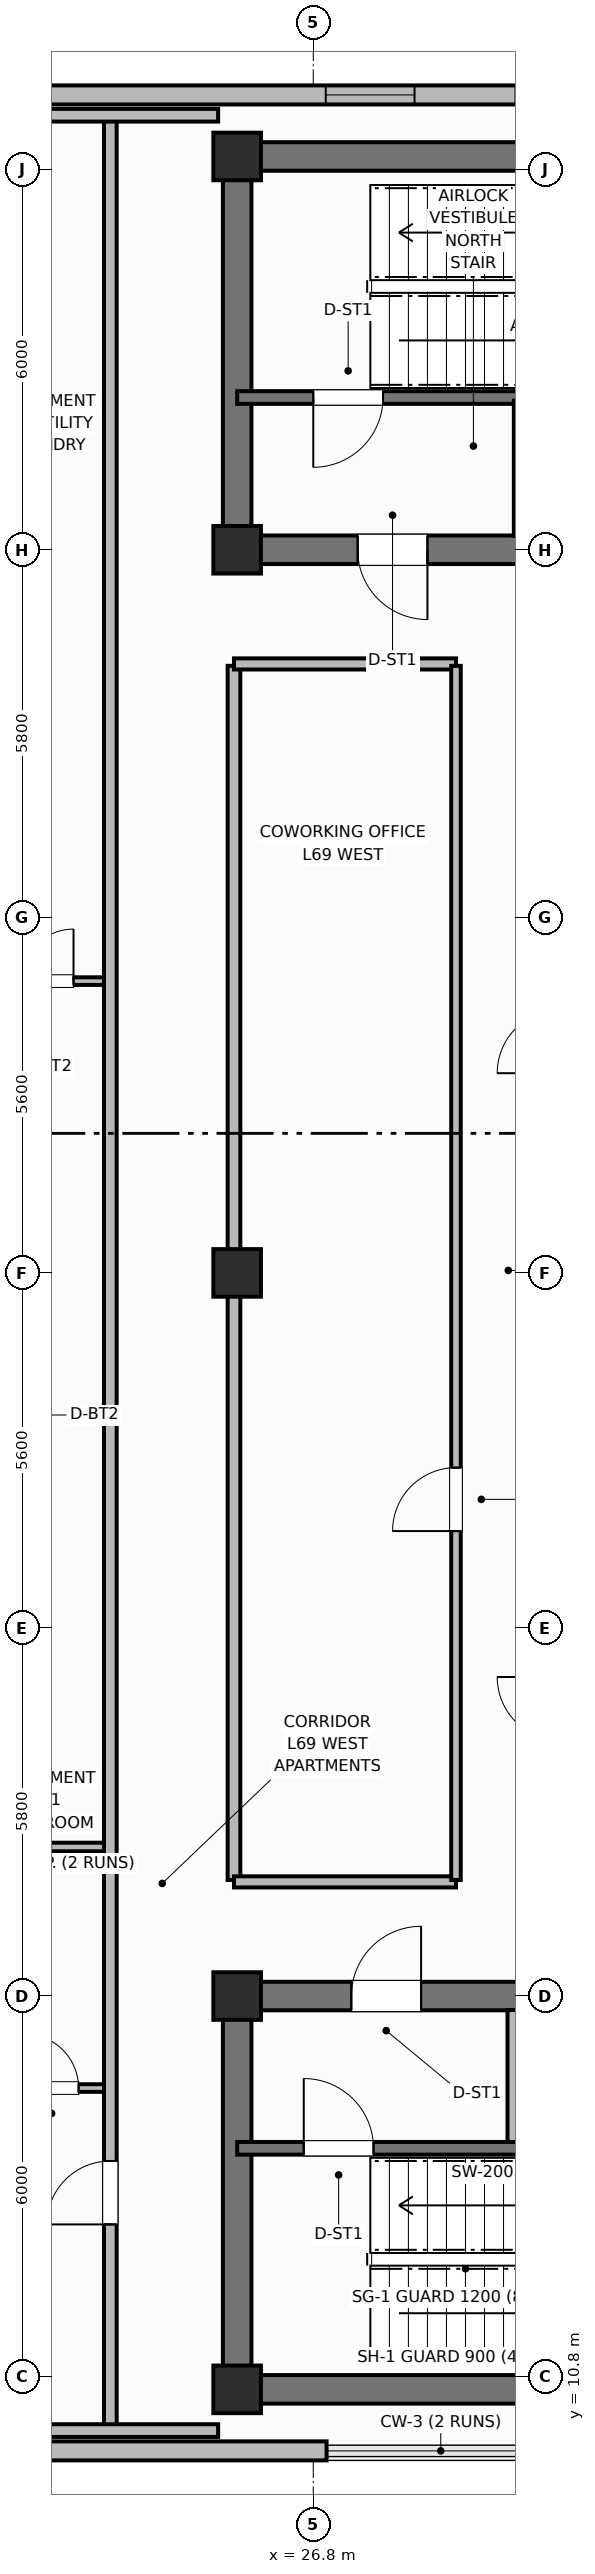
"""IFC4 building model, lengths in metres.
Left out: names, types, materials, properties, quantities, classifications, styles, units other than length and angle.
Written with IfcOpenShell. Run it as: python <this file> out.ifc"""

import sys

from ifc_helpers import new_model, si_unit, direction, frame, frame_2d, origin, origin_2d, place, context, subcontext, project, spatial, rectangle, extrude, element, fill, save


model = new_model("IFC4")
c1 = context("Model", 3, precision=1e-05, world=origin(), true_north=direction((0.0, 1.0)))
c2 = subcontext(c1, "Body", "Model", "MODEL_VIEW")
j1 = project(units=[si_unit("LENGTHUNIT", "METRE"), si_unit("PLANEANGLEUNIT", "RADIAN")], contexts=[c1])
p1 = place(None, origin())
s1 = spatial("IfcSite", under=j1, at=p1, CompositionType="ELEMENT")
p2 = place(p1, origin())
s2 = spatial("IfcBuilding", under=s1, at=p2, CompositionType="ELEMENT")
p3 = place(p2, frame((0.0, 0.0, 275.0)))
s3 = spatial("IfcBuildingStorey", under=s2, at=p3, CompositionType="ELEMENT", Elevation=275.0)
p4 = place(p3, frame((52.8, 10.6, 0.0), z_axis=(0.0, 0.0, 1.0), x_axis=(-1.0, 0.0, 0.0)))
e1 = element("IfcWall", 1, at=p4, inside=s3, PredefinedType="SHEAR", context=c2, shape_type="SweptSolid", body=[
    extrude(rectangle(XDim=27.2, YDim=0.45, at=frame_2d((13.6, 0.0))), origin(), (0.0, 0.0, 1.0), 3.7),
])
p5 = place(p3, frame((25.6, 10.825, 0.0), z_axis=(0.0, 0.0, 1.0), x_axis=(0.0, 1.0, 0.0)))
e2 = element("IfcWall", 2, at=p5, inside=s3, PredefinedType="SHEAR", context=c2, shape_type="SweptSolid", body=[
    extrude(rectangle(XDim=5.75, YDim=0.45, at=frame_2d((2.875, 0.0))), origin(), (0.0, 0.0, 1.0), 3.7),
])
p6 = place(p3, frame((25.6, 16.8, 0.0), z_axis=(0.0, 0.0, 1.0), x_axis=(1.0, 0.0, 0.0)))
e3 = element("IfcWall", 3, at=p6, inside=s3, PredefinedType="SHEAR", context=c2, shape_type="SweptSolid", body=[
    extrude(rectangle(XDim=27.2, YDim=0.45, at=frame_2d((13.6, 0.0))), origin(), (0.0, 0.0, 1.0), 3.7),
])
p7 = place(p6, frame((1.8, 0.0, 0.0)))
e4 = element("IfcOpeningElement", 4, at=p7, cuts=e3, PredefinedType="OPENING", context=c2, shape_type="SweptSolid", body=[
    extrude(rectangle(XDim=1.1, YDim=2.15, at=frame_2d((0.55, 1.075))), frame((0.0, 0.235, 0.0), z_axis=(0.0, -1.0, 0.0), x_axis=(1.0, 0.0, 0.0)), (0.0, 0.0, 1.0), 0.47),
])
p8 = place(p6, frame((5.6, 0.0, 0.0)))
e5 = element("IfcOpeningElement", 5, at=p8, cuts=e3, PredefinedType="OPENING", context=c2, shape_type="SweptSolid", body=[
    extrude(rectangle(XDim=0.85, YDim=2.1, at=frame_2d((0.425, 1.05))), frame((0.0, 0.235, 0.0), z_axis=(0.0, -1.0, 0.0), x_axis=(1.0, 0.0, 0.0)), (0.0, 0.0, 1.0), 0.47),
])
p9 = place(p6, frame((13.0, 0.0, 0.0)))
e6 = element("IfcOpeningElement", 6, at=p9, cuts=e3, PredefinedType="OPENING", context=c2, shape_type="SweptSolid", body=[
    extrude(rectangle(XDim=1.2, YDim=2.15, at=frame_2d((0.6, 1.075))), frame((0.0, 0.235, 0.0), z_axis=(0.0, -1.0, 0.0), x_axis=(1.0, 0.0, 0.0)), (0.0, 0.0, 1.0), 0.47),
])
p10 = place(p6, frame((19.2, 0.0, 0.0)))
e7 = element("IfcOpeningElement", 7, at=p10, cuts=e3, PredefinedType="OPENING", context=c2, shape_type="SweptSolid", body=[
    extrude(rectangle(XDim=0.85, YDim=2.1, at=frame_2d((0.425, 1.05))), frame((0.0, 0.235, 0.0), z_axis=(0.0, -1.0, 0.0), x_axis=(1.0, 0.0, 0.0)), (0.0, 0.0, 1.0), 0.47),
])
p11 = place(p6, frame((23.8, 0.0, 0.0)))
e8 = element("IfcOpeningElement", 8, at=p11, cuts=e3, PredefinedType="OPENING", context=c2, shape_type="SweptSolid", body=[
    extrude(rectangle(XDim=0.9, YDim=2.1, at=frame_2d((0.45, 1.05))), frame((0.0, 0.235, 0.0), z_axis=(0.0, -1.0, 0.0), x_axis=(1.0, 0.0, 0.0)), (0.0, 0.0, 1.0), 0.47),
])
p12 = place(p3, frame((25.6, 45.8, 0.0), z_axis=(0.0, 0.0, 1.0), x_axis=(1.0, 0.0, 0.0)))
e9 = element("IfcWall", 9, at=p12, inside=s3, PredefinedType="SHEAR", context=c2, shape_type="SweptSolid", body=[
    extrude(rectangle(XDim=27.2, YDim=0.45, at=frame_2d((13.6, 0.0))), origin(), (0.0, 0.0, 1.0), 3.7),
])
p13 = place(p3, frame((25.6, 39.825, 0.0), z_axis=(0.0, 0.0, 1.0), x_axis=(0.0, 1.0, 0.0)))
e10 = element("IfcWall", 10, at=p13, inside=s3, PredefinedType="SHEAR", context=c2, shape_type="SweptSolid", body=[
    extrude(rectangle(XDim=5.75, YDim=0.45, at=frame_2d((2.875, 0.0))), origin(), (0.0, 0.0, 1.0), 3.7),
])
p14 = place(p3, frame((52.8, 39.6, 0.0), z_axis=(0.0, 0.0, 1.0), x_axis=(-1.0, 0.0, 0.0)))
e11 = element("IfcWall", 11, at=p14, inside=s3, PredefinedType="SHEAR", context=c2, shape_type="SweptSolid", body=[
    extrude(rectangle(XDim=27.2, YDim=0.45, at=frame_2d((13.6, 0.0))), origin(), (0.0, 0.0, 1.0), 3.7),
])
p15 = place(p14, frame((24.2, 0.0, 0.0)))
e12 = element("IfcOpeningElement", 12, at=p15, cuts=e11, PredefinedType="OPENING", context=c2, shape_type="SweptSolid", body=[
    extrude(rectangle(XDim=1.1, YDim=2.15, at=frame_2d((0.55, 1.075))), frame((0.0, 0.235, 0.0), z_axis=(0.0, -1.0, 0.0), x_axis=(1.0, 0.0, 0.0)), (0.0, 0.0, 1.0), 0.47),
])
p16 = place(p14, frame((20.55, 0.0, 0.0)))
e13 = element("IfcOpeningElement", 13, at=p16, cuts=e11, PredefinedType="OPENING", context=c2, shape_type="SweptSolid", body=[
    extrude(rectangle(XDim=0.95, YDim=2.1, at=frame_2d((0.475, 1.05))), frame((0.0, 0.235, 0.0), z_axis=(0.0, -1.0, 0.0), x_axis=(1.0, 0.0, 0.0)), (0.0, 0.0, 1.0), 0.47),
])
p17 = place(p14, frame((15.1, 0.0, 0.0)))
e14 = element("IfcOpeningElement", 14, at=p17, cuts=e11, PredefinedType="OPENING", context=c2, shape_type="SweptSolid", body=[
    extrude(rectangle(XDim=1.2, YDim=2.15, at=frame_2d((0.6, 1.075))), frame((0.0, 0.235, 0.0), z_axis=(0.0, -1.0, 0.0), x_axis=(1.0, 0.0, 0.0)), (0.0, 0.0, 1.0), 0.47),
])
p18 = place(p14, frame((13.05, 0.0, 0.0)))
e15 = element("IfcOpeningElement", 15, at=p18, cuts=e11, PredefinedType="OPENING", context=c2, shape_type="SweptSolid", body=[
    extrude(rectangle(XDim=0.85, YDim=2.1, at=frame_2d((0.425, 1.05))), frame((0.0, 0.235, 0.0), z_axis=(0.0, -1.0, 0.0), x_axis=(1.0, 0.0, 0.0)), (0.0, 0.0, 1.0), 0.47),
])
p19 = place(p14, frame((11.0, 0.0, 0.0)))
e16 = element("IfcOpeningElement", 16, at=p19, cuts=e11, PredefinedType="OPENING", context=c2, shape_type="SweptSolid", body=[
    extrude(rectangle(XDim=0.85, YDim=2.1, at=frame_2d((0.425, 1.05))), frame((0.0, 0.235, 0.0), z_axis=(0.0, -1.0, 0.0), x_axis=(1.0, 0.0, 0.0)), (0.0, 0.0, 1.0), 0.47),
])
p20 = place(p14, frame((7.35, 0.0, 0.0)))
e17 = element("IfcOpeningElement", 17, at=p20, cuts=e11, PredefinedType="OPENING", context=c2, shape_type="SweptSolid", body=[
    extrude(rectangle(XDim=0.85, YDim=2.1, at=frame_2d((0.425, 1.05))), frame((0.0, 0.235, 0.0), z_axis=(0.0, -1.0, 0.0), x_axis=(1.0, 0.0, 0.0)), (0.0, 0.0, 1.0), 0.47),
])
p21 = place(p14, frame((4.2, 0.0, 0.0)))
e18 = element("IfcOpeningElement", 18, at=p21, cuts=e11, PredefinedType="OPENING", context=c2, shape_type="SweptSolid", body=[
    extrude(rectangle(XDim=1.3, YDim=2.2, at=frame_2d((0.65, 1.1))), frame((0.0, 0.235, 0.0), z_axis=(0.0, -1.0, 0.0), x_axis=(1.0, 0.0, 0.0)), (0.0, 0.0, 1.0), 0.47),
])
for number, where, z_axis, x_axis in (
    (19, (25.6, 10.6, 0.0), (0.0, 0.0, 1.0), (1.0, 0.0, 0.0)),
    (20, (25.6, 16.8, 0.0), (0.0, 0.0, 1.0), (1.0, 0.0, 0.0)),
    (21, (25.6, 39.6, 0.0), (0.0, 0.0, 1.0), (1.0, 0.0, 0.0)),
    (22, (25.6, 45.8, 0.0), (0.0, 0.0, 1.0), (1.0, 0.0, 0.0)),
    (23, (25.6, 28.2, 0.0), (0.0, 0.0, 1.0), (1.0, 0.0, 0.0)),
):
    element("IfcColumn", number, at=place(p3, frame(where, z_axis=z_axis, x_axis=x_axis)), inside=s3, PredefinedType="COLUMN", context=c2, shape_type="SweptSolid", body=[
        extrude(rectangle(XDim=0.75, YDim=0.75, at=origin_2d()), origin(), (0.0, 0.0, 1.0), 3.7),
    ])
p22 = place(p3, frame((22.56, 9.63, 0.0), z_axis=(0.0, 0.0, 1.0), x_axis=(1.0, 0.0, 0.0)))
e24 = element("IfcWall", 24, at=p22, inside=s3, PredefinedType="SOLIDWALL", context=c2, shape_type="SweptSolid", body=[
    extrude(rectangle(XDim=4.45, YDim=0.3, at=frame_2d((2.225, 0.0))), origin(), (0.0, 0.0, 1.0), 2.73),
])
p23 = place(p3, frame((47.79, 46.77, 0.0), z_axis=(0.0, 0.0, 1.0), x_axis=(-1.0, 0.0, 0.0)))
e25 = element("IfcWall", 25, at=p23, inside=s3, PredefinedType="SOLIDWALL", context=c2, shape_type="SweptSolid", body=[
    extrude(rectangle(XDim=25.23, YDim=0.3, at=frame_2d((12.615, 0.0))), origin(), (0.0, 0.0, 1.0), 2.73),
])
p24 = place(p23, frame((1.446, 0.0, 0.76)))
e26 = element("IfcOpeningElement", 26, at=p24, cuts=e25, PredefinedType="OPENING", context=c2, shape_type="SweptSolid", body=[
    extrude(rectangle(XDim=1.4, YDim=1.85, at=frame_2d((0.7, 0.925))), frame((0.0, 0.16, 0.0), z_axis=(0.0, -1.0, 0.0), x_axis=(1.0, 0.0, 0.0)), (0.0, 0.0, 1.0), 0.32),
])
p25 = place(p23, frame((7.428, 0.0, 0.76)))
e27 = element("IfcOpeningElement", 27, at=p25, cuts=e25, PredefinedType="OPENING", context=c2, shape_type="SweptSolid", body=[
    extrude(rectangle(XDim=1.4, YDim=1.85, at=frame_2d((0.7, 0.925))), frame((0.0, 0.16, 0.0), z_axis=(0.0, -1.0, 0.0), x_axis=(1.0, 0.0, 0.0)), (0.0, 0.0, 1.0), 0.32),
])
p26 = place(p23, frame((9.719, 0.0, 0.76)))
e28 = element("IfcOpeningElement", 28, at=p26, cuts=e25, PredefinedType="OPENING", context=c2, shape_type="SweptSolid", body=[
    extrude(rectangle(XDim=1.4, YDim=1.85, at=frame_2d((0.7, 0.925))), frame((0.0, 0.16, 0.0), z_axis=(0.0, -1.0, 0.0), x_axis=(1.0, 0.0, 0.0)), (0.0, 0.0, 1.0), 0.32),
])
p27 = place(p23, frame((14.111, 0.0, 0.76)))
e29 = element("IfcOpeningElement", 29, at=p27, cuts=e25, PredefinedType="OPENING", context=c2, shape_type="SweptSolid", body=[
    extrude(rectangle(XDim=1.4, YDim=1.85, at=frame_2d((0.7, 0.925))), frame((0.0, 0.16, 0.0), z_axis=(0.0, -1.0, 0.0), x_axis=(1.0, 0.0, 0.0)), (0.0, 0.0, 1.0), 0.32),
])
p28 = place(p23, frame((16.402, 0.0, 0.76)))
e30 = element("IfcOpeningElement", 30, at=p28, cuts=e25, PredefinedType="OPENING", context=c2, shape_type="SweptSolid", body=[
    extrude(rectangle(XDim=1.4, YDim=1.85, at=frame_2d((0.7, 0.925))), frame((0.0, 0.16, 0.0), z_axis=(0.0, -1.0, 0.0), x_axis=(1.0, 0.0, 0.0)), (0.0, 0.0, 1.0), 0.32),
])
p29 = place(p23, frame((19.393, 0.0, 0.76)))
e31 = element("IfcOpeningElement", 31, at=p29, cuts=e25, PredefinedType="OPENING", context=c2, shape_type="SweptSolid", body=[
    extrude(rectangle(XDim=1.4, YDim=1.85, at=frame_2d((0.7, 0.925))), frame((0.0, 0.16, 0.0), z_axis=(0.0, -1.0, 0.0), x_axis=(1.0, 0.0, 0.0)), (0.0, 0.0, 1.0), 0.32),
])
p30 = place(p3, frame((25.6, 14.4, 0.0), z_axis=(0.0, 0.0, 1.0), x_axis=(1.0, 0.0, 0.0)))
e32 = element("IfcWall", 32, at=p30, inside=s3, PredefinedType="SHEAR", context=c2, shape_type="SweptSolid", body=[
    extrude(rectangle(XDim=9.55, YDim=0.2, at=frame_2d((4.775, 0.0))), origin(), (0.0, 0.0, 1.0), 3.7),
])
p31 = place(p30, frame((1.05, 0.0, 0.0)))
e33 = element("IfcOpeningElement", 33, at=p31, cuts=e32, PredefinedType="OPENING", context=c2, shape_type="SweptSolid", body=[
    extrude(rectangle(XDim=1.1, YDim=2.15, at=frame_2d((0.55, 1.075))), frame((0.0, 0.11, 0.0), z_axis=(0.0, -1.0, 0.0), x_axis=(1.0, 0.0, 0.0)), (0.0, 0.0, 1.0), 0.22),
])
p32 = place(p3, frame((29.95, 14.5, 0.0), z_axis=(0.0, 0.0, 1.0), x_axis=(0.0, 1.0, 0.0)))
e34 = element("IfcWall", 34, at=p32, inside=s3, PredefinedType="PARTITIONING", context=c2, shape_type="SweptSolid", body=[
    extrude(rectangle(XDim=2.08, YDim=0.175, at=frame_2d((1.04, 0.0))), origin(), (0.0, 0.0, 1.0), 2.56),
])
p33 = place(p3, frame((35.15, 42.0, 0.0), z_axis=(0.0, 0.0, 1.0), x_axis=(-1.0, 0.0, 0.0)))
e35 = element("IfcWall", 35, at=p33, inside=s3, PredefinedType="SHEAR", context=c2, shape_type="SweptSolid", body=[
    extrude(rectangle(XDim=9.55, YDim=0.2, at=frame_2d((4.775, 0.0))), origin(), (0.0, 0.0, 1.0), 3.7),
])
p34 = place(p33, frame((7.25, 0.0, 0.0)))
e36 = element("IfcOpeningElement", 36, at=p34, cuts=e35, PredefinedType="OPENING", context=c2, shape_type="SweptSolid", body=[
    extrude(rectangle(XDim=1.1, YDim=2.15, at=frame_2d((0.55, 1.075))), frame((0.0, 0.11, 0.0), z_axis=(0.0, -1.0, 0.0), x_axis=(1.0, 0.0, 0.0)), (0.0, 0.0, 1.0), 0.22),
])
p35 = place(p3, frame((30.05, 39.82, 0.0), z_axis=(0.0, 0.0, 1.0), x_axis=(0.0, 1.0, 0.0)))
e37 = element("IfcWall", 37, at=p35, inside=s3, PredefinedType="PARTITIONING", context=c2, shape_type="SweptSolid", body=[
    extrude(rectangle(XDim=2.13, YDim=0.175, at=frame_2d((1.065, 0.0))), origin(), (0.0, 0.0, 1.0), 2.56),
])
p36 = place(p3, frame((25.55, 18.63, 0.0), z_axis=(0.0, 0.0, 1.0), x_axis=(0.0, 1.0, 0.0)))
e38 = element("IfcWall", 38, at=p36, inside=s3, PredefinedType="PARTITIONING", context=c2, shape_type="SweptSolid", body=[
    extrude(rectangle(XDim=19.14, YDim=0.2, at=frame_2d((9.57, 0.0))), origin(), (0.0, 0.0, 1.0), 2.56),
])
for number, where, z_axis, x_axis in (
    (39, (25.55, 18.6, 0.0), (0.0, 0.0, 1.0), (1.0, 0.0, 0.0)),
    (40, (25.55, 37.8, 0.0), (0.0, 0.0, 1.0), (1.0, 0.0, 0.0)),
):
    element("IfcWall", number, at=place(p3, frame(where, z_axis=z_axis, x_axis=x_axis)), inside=s3, PredefinedType="PARTITIONING", context=c2, shape_type="SweptSolid", body=[
        extrude(rectangle(XDim=3.5, YDim=0.175, at=frame_2d((1.75, 0.0))), origin(), (0.0, 0.0, 1.0), 2.56),
    ])
p37 = place(p3, frame((29.05, 18.63, 0.0), z_axis=(0.0, 0.0, 1.0), x_axis=(0.0, 1.0, 0.0)))
e41 = element("IfcWall", 41, at=p37, inside=s3, PredefinedType="PARTITIONING", context=c2, shape_type="SweptSolid", body=[
    extrude(rectangle(XDim=19.14, YDim=0.15, at=frame_2d((9.57, 0.0))), origin(), (0.0, 0.0, 1.0), 2.56),
])
p38 = place(p37, frame((5.5, 0.0, 0.0)))
e42 = element("IfcOpeningElement", 42, at=p38, cuts=e41, PredefinedType="OPENING", context=c2, shape_type="SweptSolid", body=[
    extrude(rectangle(XDim=1.0, YDim=2.15, at=frame_2d((0.5, 1.075))), frame((0.0, 0.085, 0.0), z_axis=(0.0, -1.0, 0.0), x_axis=(1.0, 0.0, 0.0)), (0.0, 0.0, 1.0), 0.17),
])
p39 = place(p3, frame((21.65, 15.35, 0.0), z_axis=(0.0, 0.0, 1.0), x_axis=(1.0, 0.0, 0.0)))
e43 = element("IfcWall", 43, at=p39, inside=s3, PredefinedType="PARTITIONING", context=c2, shape_type="SweptSolid", body=[
    extrude(rectangle(XDim=1.95, YDim=0.12, at=frame_2d((0.975, 0.0))), origin(), (0.0, 0.0, 1.0), 2.56),
])
p40 = place(p39, frame((0.6, 0.0, 0.0)))
e44 = element("IfcOpeningElement", 44, at=p40, cuts=e43, PredefinedType="OPENING", context=c2, shape_type="SweptSolid", body=[
    extrude(rectangle(XDim=0.85, YDim=2.1, at=frame_2d((0.425, 1.05))), frame((0.0, 0.07, 0.0), z_axis=(0.0, -1.0, 0.0), x_axis=(1.0, 0.0, 0.0)), (0.0, 0.0, 1.0), 0.14),
])
p41 = place(p3, frame((21.65, 19.15, 0.0), z_axis=(0.0, 0.0, 1.0), x_axis=(1.0, 0.0, 0.0)))
e45 = element("IfcWall", 45, at=p41, inside=s3, PredefinedType="PARTITIONING", context=c2, shape_type="SweptSolid", body=[
    extrude(rectangle(XDim=1.95, YDim=0.135, at=frame_2d((0.975, 0.0))), origin(), (0.0, 0.0, 1.0), 2.56),
])
p42 = place(p3, frame((21.65, 32.8, 0.0), z_axis=(0.0, 0.0, 1.0), x_axis=(1.0, 0.0, 0.0)))
e46 = element("IfcWall", 46, at=p42, inside=s3, PredefinedType="PARTITIONING", context=c2, shape_type="SweptSolid", body=[
    extrude(rectangle(XDim=1.95, YDim=0.12, at=frame_2d((0.975, 0.0))), origin(), (0.0, 0.0, 1.0), 2.56),
])
p43 = place(p42, frame((0.55, 0.0, 0.0)))
e47 = element("IfcOpeningElement", 47, at=p43, cuts=e46, PredefinedType="OPENING", context=c2, shape_type="SweptSolid", body=[
    extrude(rectangle(XDim=0.82, YDim=2.08, at=frame_2d((0.41, 1.04))), frame((0.0, 0.07, 0.0), z_axis=(0.0, -1.0, 0.0), x_axis=(1.0, 0.0, 0.0)), (0.0, 0.0, 1.0), 0.14),
])
p44 = place(p3, frame((23.6, 9.95, 0.0), z_axis=(0.0, 0.0, 1.0), x_axis=(0.0, 1.0, 0.0)))
e48 = element("IfcWall", 48, at=p44, inside=s3, PredefinedType="PARTITIONING", context=c2, shape_type="SweptSolid", body=[
    extrude(rectangle(XDim=36.5, YDim=0.2, at=frame_2d((18.25, 0.0))), origin(), (0.0, 0.0, 1.0), 2.56),
])
p45 = place(p44, frame((3.25, 0.0, 0.0)))
e49 = element("IfcOpeningElement", 49, at=p45, cuts=e48, PredefinedType="OPENING", context=c2, shape_type="SweptSolid", body=[
    extrude(rectangle(XDim=1.0, YDim=2.15, at=frame_2d((0.5, 1.075))), frame((0.0, 0.11, 0.0), z_axis=(0.0, -1.0, 0.0), x_axis=(1.0, 0.0, 0.0)), (0.0, 0.0, 1.0), 0.22),
])
for number, where, z_axis, x_axis in (
    (50, (21.546, 9.95, 0.0), (0.0, 0.0, 1.0), (1.0, 0.0, 0.0)),
    (51, (21.546, 46.45, 0.0), (0.0, 0.0, 1.0), (1.0, 0.0, 0.0)),
):
    element("IfcWall", number, at=place(p3, frame(where, z_axis=z_axis, x_axis=x_axis)), inside=s3, PredefinedType="PARTITIONING", context=c2, shape_type="SweptSolid", body=[
        extrude(rectangle(XDim=3.754, YDim=0.2, at=frame_2d((1.877, 0.0))), origin(), (0.0, 0.0, 1.0), 2.56),
    ])
p46 = place(p29, origin())
e52 = element("IfcWindow", 52, at=p46, inside=s3, PartitioningType="SINGLE_PANEL", PredefinedType="WINDOW", context=c2, shape_type="SweptSolid", body=[
    extrude(rectangle(XDim=1.4, YDim=1.85, at=frame_2d((0.7, 0.925))), frame((0.0, 0.03, 0.0), z_axis=(0.0, -1.0, 0.0), x_axis=(1.0, 0.0, 0.0)), (0.0, 0.0, 1.0), 0.06),
])
fill(e31, e52)
p47 = place(p31, origin())
e53 = element("IfcDoor", 53, at=p47, inside=s3, OperationType="SINGLE_SWING_LEFT", PredefinedType="DOOR", context=c2, shape_type="SweptSolid", body=[
    extrude(rectangle(XDim=1.1, YDim=2.15, at=frame_2d((0.55, 1.075))), frame((0.0, 0.025, 0.0), z_axis=(0.0, -1.0, 0.0), x_axis=(1.0, 0.0, 0.0)), (0.0, 0.0, 1.0), 0.05),
])
fill(e33, e53)
p48 = place(p34, origin())
e54 = element("IfcDoor", 54, at=p48, inside=s3, OperationType="SINGLE_SWING_RIGHT", PredefinedType="DOOR", context=c2, shape_type="SweptSolid", body=[
    extrude(rectangle(XDim=1.1, YDim=2.15, at=frame_2d((0.55, 1.075))), frame((0.0, 0.025, 0.0), z_axis=(0.0, -1.0, 0.0), x_axis=(1.0, 0.0, 0.0)), (0.0, 0.0, 1.0), 0.05),
])
fill(e36, e54)
p49 = place(p38, origin())
e55 = element("IfcDoor", 55, at=p49, inside=s3, OperationType="SINGLE_SWING_LEFT", PredefinedType="DOOR", context=c2, shape_type="SweptSolid", body=[
    extrude(rectangle(XDim=1.0, YDim=2.15, at=frame_2d((0.5, 1.075))), frame((0.0, 0.025, 0.0), z_axis=(0.0, -1.0, 0.0), x_axis=(1.0, 0.0, 0.0)), (0.0, 0.0, 1.0), 0.05),
])
fill(e42, e55)
p50 = place(p40, origin())
e56 = element("IfcDoor", 56, at=p50, inside=s3, OperationType="SINGLE_SWING_LEFT", PredefinedType="DOOR", context=c2, shape_type="SweptSolid", body=[
    extrude(rectangle(XDim=0.85, YDim=2.1, at=frame_2d((0.425, 1.05))), frame((0.0, 0.025, 0.0), z_axis=(0.0, -1.0, 0.0), x_axis=(1.0, 0.0, 0.0)), (0.0, 0.0, 1.0), 0.05),
])
fill(e44, e56)
p51 = place(p43, origin())
e57 = element("IfcDoor", 57, at=p51, inside=s3, OperationType="SINGLE_SWING_RIGHT", PredefinedType="DOOR", context=c2, shape_type="SweptSolid", body=[
    extrude(rectangle(XDim=0.82, YDim=2.08, at=frame_2d((0.41, 1.04))), frame((0.0, 0.025, 0.0), z_axis=(0.0, -1.0, 0.0), x_axis=(1.0, 0.0, 0.0)), (0.0, 0.0, 1.0), 0.05),
])
fill(e47, e57)
p52 = place(p45, origin())
e58 = element("IfcDoor", 58, at=p52, inside=s3, OperationType="SINGLE_SWING_LEFT", PredefinedType="DOOR", context=c2, shape_type="SweptSolid", body=[
    extrude(rectangle(XDim=1.0, YDim=2.15, at=frame_2d((0.5, 1.075))), frame((0.0, 0.025, 0.0), z_axis=(0.0, -1.0, 0.0), x_axis=(1.0, 0.0, 0.0)), (0.0, 0.0, 1.0), 0.05),
])
fill(e49, e58)
p53 = place(p7, origin())
e59 = element("IfcDoor", 59, at=p53, inside=s3, OperationType="SINGLE_SWING_RIGHT", PredefinedType="DOOR", context=c2, shape_type="SweptSolid", body=[
    extrude(rectangle(XDim=1.1, YDim=2.15, at=frame_2d((0.55, 1.075))), frame((0.0, 0.025, 0.0), z_axis=(0.0, -1.0, 0.0), x_axis=(1.0, 0.0, 0.0)), (0.0, 0.0, 1.0), 0.05),
])
fill(e4, e59)
p54 = place(p15, origin())
e60 = element("IfcDoor", 60, at=p54, inside=s3, OperationType="SINGLE_SWING_LEFT", PredefinedType="DOOR", context=c2, shape_type="SweptSolid", body=[
    extrude(rectangle(XDim=1.1, YDim=2.15, at=frame_2d((0.55, 1.075))), frame((0.0, 0.025, 0.0), z_axis=(0.0, -1.0, 0.0), x_axis=(1.0, 0.0, 0.0)), (0.0, 0.0, 1.0), 0.05),
])
fill(e12, e60)
save(model, sys.argv[1])
